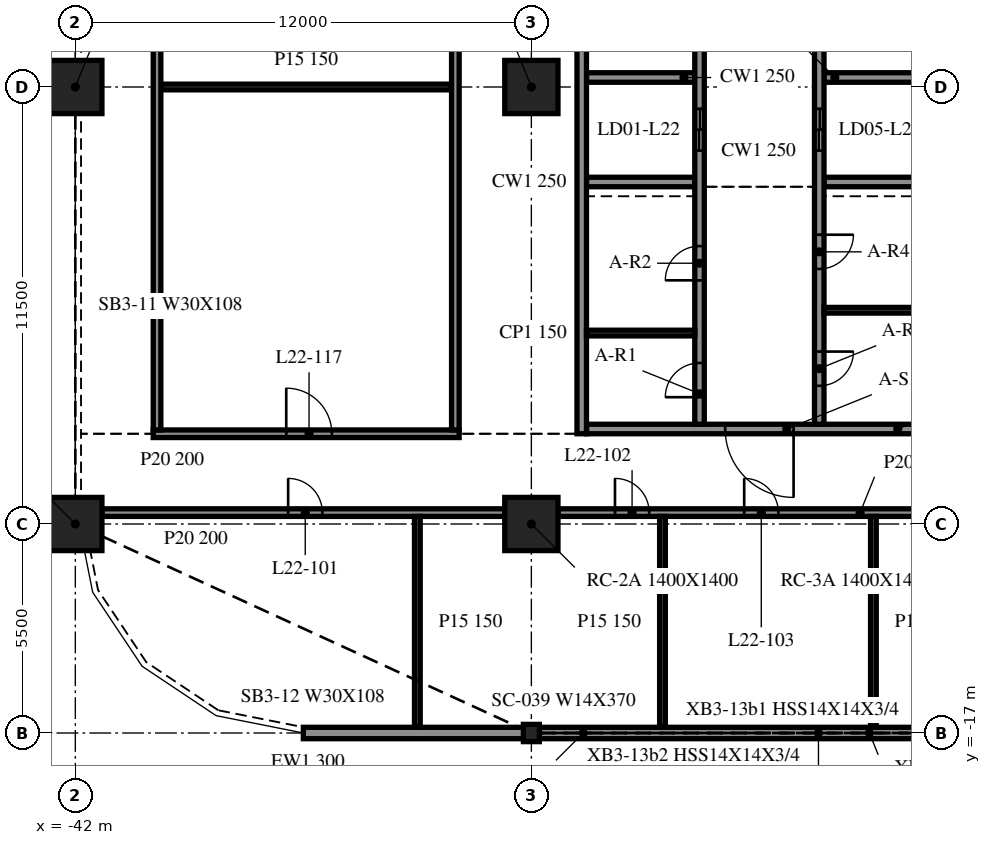
"""IFC4 building model, lengths in metres.
Left out: names, types, materials, properties, quantities, classifications, styles, units other than length and angle.
Written with IfcOpenShell. Run it as: python <this file> out.ifc"""

import sys

from ifc_helpers import new_model, si_unit, direction, frame, frame_2d, origin, origin_2d, place, context, subcontext, project, spatial, rectangle, i_section, extrude, element, fill, save


model = new_model("IFC4")
c1 = context("Model", 3, precision=1e-05, world=origin(), true_north=direction((0.0, 1.0)))
c2 = subcontext(c1, "Body", "Model", "MODEL_VIEW")
j1 = project(units=[si_unit("LENGTHUNIT", "METRE"), si_unit("PLANEANGLEUNIT", "RADIAN")], contexts=[c1])
p1 = place(None, origin())
s1 = spatial("IfcSite", under=j1, at=p1, CompositionType="ELEMENT")
p2 = place(p1, origin())
s2 = spatial("IfcBuilding", under=s1, at=p2, CompositionType="ELEMENT")
p3 = place(p2, frame((0.0, 0.0, 97.1)))
s3 = spatial("IfcBuildingStorey", under=s2, at=p3, CompositionType="ELEMENT", Elevation=97.1)
for number, where, z_axis, x_axis in (
    (1, (-42.0, -11.5, -0.34), (0.0, 0.0, 1.0), (1.0, 0.0, 0.0)),
    (2, (-42.0, 0.0, -0.34), (0.0, 0.0, 1.0), (1.0, 0.0, 0.0)),
    (3, (-30.0, -11.5, -0.34), (0.0, 0.0, 1.0), (1.0, 0.0, 0.0)),
    (4, (-30.0, 0.0, -0.34), (0.0, 0.0, 1.0), (1.0, 0.0, 0.0)),
):
    element("IfcColumn", number, at=place(p3, frame(where, z_axis=z_axis, x_axis=x_axis)), inside=s3, PredefinedType="COLUMN", context=c2, shape_type="SweptSolid", body=[
        extrude(rectangle(XDim=1.4, YDim=1.4, at=origin_2d()), origin(), (0.0, 0.0, 1.0), 4.1),
    ])
p4 = place(p3, frame((-30.0, -17.0, -0.34), z_axis=(0.0, 0.0, 1.0), x_axis=(1.0, 0.0, 0.0)))
e5 = element("IfcColumn", 5, at=p4, inside=s3, PredefinedType="COLUMN", context=c2, shape_type="SweptSolid", body=[
    extrude(i_section(OverallWidth=0.419, OverallDepth=0.455, WebThickness=0.042, FlangeThickness=0.068, at=origin_2d()), origin(), (0.0, 0.0, 1.0), 4.1),
])
p5 = place(p3, frame((-36.0, -17.0, 0.0), z_axis=(0.0, 0.0, 1.0), x_axis=(1.0, 0.0, 0.0)))
e6 = element("IfcWall", 6, at=p5, inside=s3, PredefinedType="NOTDEFINED", context=c2, shape_type="SweptSolid", body=[
    extrude(rectangle(XDim=5.979, YDim=0.3, at=frame_2d((2.99, 0.0))), origin(), (0.0, 0.0, 1.0), 3.003),
])
p6 = place(p3, frame((-29.979, -17.0, 0.0), z_axis=(0.0, 0.0, 1.0), x_axis=(1.0, 0.0, 0.0)))
e7 = element("IfcWall", 7, at=p6, inside=s3, PredefinedType="NOTDEFINED", context=c2, shape_type="SweptSolid", body=[
    extrude(rectangle(XDim=11.958, YDim=0.3, at=frame_2d((5.979, 0.0))), origin(), (0.0, 0.0, 1.0), 3.003),
])
p7 = place(p3, frame((-28.675, 15.125, 0.0), z_axis=(0.0, 0.0, 1.0), x_axis=(0.0, -1.0, 0.0)))
e8 = element("IfcWall", 8, at=p7, inside=s3, PredefinedType="SOLIDWALL", context=c2, shape_type="SweptSolid", body=[
    extrude(rectangle(XDim=24.25, YDim=0.25, at=frame_2d((12.125, 0.0))), origin(), (0.0, 0.0, 1.0), 3.76),
])
p8 = place(p3, frame((-19.45, -9.0, 0.0), z_axis=(0.0, 0.0, 1.0), x_axis=(-1.0, 0.0, 0.0)))
e9 = element("IfcWall", 9, at=p8, inside=s3, PredefinedType="SOLIDWALL", context=c2, shape_type="SweptSolid", body=[
    extrude(rectangle(XDim=9.1, YDim=0.25, at=frame_2d((4.55, 0.0))), origin(), (0.0, 0.0, 1.0), 3.76),
])
p9 = place(p8, frame((3.65, 0.0, 0.0)))
e10 = element("IfcOpeningElement", 10, at=p9, cuts=e9, PredefinedType="OPENING", context=c2, shape_type="SweptSolid", body=[
    extrude(rectangle(XDim=1.8, YDim=2.1, at=frame_2d((0.9, 1.05))), frame((0.0, 0.135, 0.0), z_axis=(0.0, -1.0, 0.0), x_axis=(1.0, 0.0, 0.0)), (0.0, 0.0, 1.0), 0.27),
])
p10 = place(p3, frame((-25.575, -8.875, 0.0), z_axis=(0.0, 0.0, 1.0), x_axis=(0.0, 1.0, 0.0)))
e11 = element("IfcWall", 11, at=p10, inside=s3, PredefinedType="SOLIDWALL", context=c2, shape_type="SweptSolid", body=[
    extrude(rectangle(XDim=17.5, YDim=0.25, at=frame_2d((8.75, 0.0))), origin(), (0.0, 0.0, 1.0), 3.76),
])
p11 = place(p10, frame((7.2, 0.0, 0.0)))
e12 = element("IfcOpeningElement", 12, at=p11, cuts=e11, PredefinedType="OPENING", context=c2, shape_type="SweptSolid", body=[
    extrude(rectangle(XDim=1.1, YDim=2.1, at=frame_2d((0.55, 1.05))), frame((0.0, 0.135, 0.0), z_axis=(0.0, -1.0, 0.0), x_axis=(1.0, 0.0, 0.0)), (0.0, 0.0, 1.0), 0.27),
])
p12 = place(p10, frame((9.95, 0.0, 0.0)))
e13 = element("IfcOpeningElement", 13, at=p12, cuts=e11, PredefinedType="OPENING", context=c2, shape_type="SweptSolid", body=[
    extrude(rectangle(XDim=1.1, YDim=2.1, at=frame_2d((0.55, 1.05))), frame((0.0, 0.135, 0.0), z_axis=(0.0, -1.0, 0.0), x_axis=(1.0, 0.0, 0.0)), (0.0, 0.0, 1.0), 0.27),
])
p13 = place(p10, frame((12.7, 0.0, 0.0)))
e14 = element("IfcOpeningElement", 14, at=p13, cuts=e11, PredefinedType="OPENING", context=c2, shape_type="SweptSolid", body=[
    extrude(rectangle(XDim=1.1, YDim=2.1, at=frame_2d((0.55, 1.05))), frame((0.0, 0.135, 0.0), z_axis=(0.0, -1.0, 0.0), x_axis=(1.0, 0.0, 0.0)), (0.0, 0.0, 1.0), 0.27),
])
p14 = place(p10, frame((15.45, 0.0, 0.0)))
e15 = element("IfcOpeningElement", 15, at=p14, cuts=e11, PredefinedType="OPENING", context=c2, shape_type="SweptSolid", body=[
    extrude(rectangle(XDim=1.1, YDim=2.1, at=frame_2d((0.55, 1.05))), frame((0.0, 0.135, 0.0), z_axis=(0.0, -1.0, 0.0), x_axis=(1.0, 0.0, 0.0)), (0.0, 0.0, 1.0), 0.27),
])
p15 = place(p10, frame((0.712, 0.0, 0.0)))
e16 = element("IfcOpeningElement", 16, at=p15, cuts=e11, PredefinedType="OPENING", context=c2, shape_type="SweptSolid", body=[
    extrude(rectangle(XDim=0.9, YDim=2.1, at=frame_2d((0.45, 1.05))), frame((0.0, 0.135, 0.0), z_axis=(0.0, -1.0, 0.0), x_axis=(1.0, 0.0, 0.0)), (0.0, 0.0, 1.0), 0.27),
])
p16 = place(p10, frame((3.788, 0.0, 0.0)))
e17 = element("IfcOpeningElement", 17, at=p16, cuts=e11, PredefinedType="OPENING", context=c2, shape_type="SweptSolid", body=[
    extrude(rectangle(XDim=0.9, YDim=2.1, at=frame_2d((0.45, 1.05))), frame((0.0, 0.135, 0.0), z_axis=(0.0, -1.0, 0.0), x_axis=(1.0, 0.0, 0.0)), (0.0, 0.0, 1.0), 0.27),
])
p17 = place(p3, frame((-22.425, 14.875, 0.0), z_axis=(0.0, 0.0, 1.0), x_axis=(0.0, -1.0, 0.0)))
e18 = element("IfcWall", 18, at=p17, inside=s3, PredefinedType="SOLIDWALL", context=c2, shape_type="SweptSolid", body=[
    extrude(rectangle(XDim=23.75, YDim=0.25, at=frame_2d((11.875, 0.0))), origin(), (0.0, 0.0, 1.0), 3.76),
])
p18 = place(p17, frame((15.45, 0.0, 0.0)))
e19 = element("IfcOpeningElement", 19, at=p18, cuts=e18, PredefinedType="OPENING", context=c2, shape_type="SweptSolid", body=[
    extrude(rectangle(XDim=1.1, YDim=2.1, at=frame_2d((0.55, 1.05))), frame((0.0, 0.135, 0.0), z_axis=(0.0, -1.0, 0.0), x_axis=(1.0, 0.0, 0.0)), (0.0, 0.0, 1.0), 0.27),
])
p19 = place(p17, frame((12.7, 0.0, 0.0)))
e20 = element("IfcOpeningElement", 20, at=p19, cuts=e18, PredefinedType="OPENING", context=c2, shape_type="SweptSolid", body=[
    extrude(rectangle(XDim=1.1, YDim=2.1, at=frame_2d((0.55, 1.05))), frame((0.0, 0.135, 0.0), z_axis=(0.0, -1.0, 0.0), x_axis=(1.0, 0.0, 0.0)), (0.0, 0.0, 1.0), 0.27),
])
p20 = place(p17, frame((21.837, 0.0, 0.0)))
e21 = element("IfcOpeningElement", 21, at=p20, cuts=e18, PredefinedType="OPENING", context=c2, shape_type="SweptSolid", body=[
    extrude(rectangle(XDim=0.9, YDim=2.1, at=frame_2d((0.45, 1.05))), frame((0.0, 0.135, 0.0), z_axis=(0.0, -1.0, 0.0), x_axis=(1.0, 0.0, 0.0)), (0.0, 0.0, 1.0), 0.27),
])
p21 = place(p17, frame((18.762, 0.0, 0.0)))
e22 = element("IfcOpeningElement", 22, at=p21, cuts=e18, PredefinedType="OPENING", context=c2, shape_type="SweptSolid", body=[
    extrude(rectangle(XDim=0.9, YDim=2.1, at=frame_2d((0.45, 1.05))), frame((0.0, 0.135, 0.0), z_axis=(0.0, -1.0, 0.0), x_axis=(1.0, 0.0, 0.0)), (0.0, 0.0, 1.0), 0.27),
])
p22 = place(p17, frame((4.587, 0.0, 0.0)))
e23 = element("IfcOpeningElement", 23, at=p22, cuts=e18, PredefinedType="OPENING", context=c2, shape_type="SweptSolid", body=[
    extrude(rectangle(XDim=0.9, YDim=2.1, at=frame_2d((0.45, 1.05))), frame((0.0, 0.135, 0.0), z_axis=(0.0, -1.0, 0.0), x_axis=(1.0, 0.0, 0.0)), (0.0, 0.0, 1.0), 0.27),
])
p23 = place(p17, frame((2.55, 0.0, 0.0)))
e24 = element("IfcOpeningElement", 24, at=p23, cuts=e18, PredefinedType="OPENING", context=c2, shape_type="SweptSolid", body=[
    extrude(rectangle(XDim=0.9, YDim=2.1, at=frame_2d((0.45, 1.05))), frame((0.0, 0.135, 0.0), z_axis=(0.0, -1.0, 0.0), x_axis=(1.0, 0.0, 0.0)), (0.0, 0.0, 1.0), 0.27),
])
p24 = place(p17, frame((0.512, 0.0, 0.0)))
e25 = element("IfcOpeningElement", 25, at=p24, cuts=e18, PredefinedType="OPENING", context=c2, shape_type="SweptSolid", body=[
    extrude(rectangle(XDim=0.9, YDim=2.1, at=frame_2d((0.45, 1.05))), frame((0.0, 0.135, 0.0), z_axis=(0.0, -1.0, 0.0), x_axis=(1.0, 0.0, 0.0)), (0.0, 0.0, 1.0), 0.27),
])
for number, where, z_axis, x_axis in (
    (26, (-28.55, -2.5, 0.0), (0.0, 0.0, 1.0), (1.0, 0.0, 0.0)),
    (27, (-28.55, 0.25, 0.0), (0.0, 0.0, 1.0), (1.0, 0.0, 0.0)),
    (28, (-22.3, -2.5, 0.0), (0.0, 0.0, 1.0), (1.0, 0.0, 0.0)),
    (29, (-22.3, 0.25, 0.0), (0.0, 0.0, 1.0), (1.0, 0.0, 0.0)),
):
    element("IfcWall", number, at=place(p3, frame(where, z_axis=z_axis, x_axis=x_axis)), inside=s3, PredefinedType="SOLIDWALL", context=c2, shape_type="SweptSolid", body=[
        extrude(rectangle(XDim=2.85, YDim=0.25, at=frame_2d((1.425, 0.0))), origin(), (0.0, 0.0, 1.0), 3.76),
    ])
for number, where, z_axis, x_axis in (
    (30, (-28.55, -6.475, 0.0), (0.0, 0.0, 1.0), (1.0, 0.0, 0.0)),
    (31, (-22.3, -5.875, 0.0), (0.0, 0.0, 1.0), (1.0, 0.0, 0.0)),
):
    element("IfcWall", number, at=place(p3, frame(where, z_axis=z_axis, x_axis=x_axis)), inside=s3, PredefinedType="PARTITIONING", context=c2, shape_type="SweptSolid", body=[
        extrude(rectangle(XDim=2.85, YDim=0.15, at=frame_2d((1.425, 0.0))), origin(), (0.0, 0.0, 1.0), 3.76),
    ])
p25 = place(p3, frame((-41.3, -11.2, 0.0), z_axis=(0.0, 0.0, 1.0), x_axis=(1.0, 0.0, 0.0)))
e32 = element("IfcWall", 32, at=p25, inside=s3, PredefinedType="PARTITIONING", context=c2, shape_type="SweptSolid", body=[
    extrude(rectangle(XDim=10.6, YDim=0.2, at=frame_2d((5.3, 0.0))), origin(), (0.0, 0.0, 1.0), 3.76),
])
p26 = place(p25, frame((4.9, 0.0, 0.0)))
e33 = element("IfcOpeningElement", 33, at=p26, cuts=e32, PredefinedType="OPENING", context=c2, shape_type="SweptSolid", body=[
    extrude(rectangle(XDim=0.9, YDim=2.1, at=frame_2d((0.45, 1.05))), frame((0.0, 0.11, 0.0), z_axis=(0.0, -1.0, 0.0), x_axis=(1.0, 0.0, 0.0)), (0.0, 0.0, 1.0), 0.22),
])
p27 = place(p3, frame((-29.3, -11.2, 0.0), z_axis=(0.0, 0.0, 1.0), x_axis=(1.0, 0.0, 0.0)))
e34 = element("IfcWall", 34, at=p27, inside=s3, PredefinedType="PARTITIONING", context=c2, shape_type="SweptSolid", body=[
    extrude(rectangle(XDim=10.6, YDim=0.2, at=frame_2d((5.3, 0.0))), origin(), (0.0, 0.0, 1.0), 3.76),
])
p28 = place(p27, frame((1.5, 0.0, 0.0)))
e35 = element("IfcOpeningElement", 35, at=p28, cuts=e34, PredefinedType="OPENING", context=c2, shape_type="SweptSolid", body=[
    extrude(rectangle(XDim=0.9, YDim=2.1, at=frame_2d((0.45, 1.05))), frame((0.0, 0.11, 0.0), z_axis=(0.0, -1.0, 0.0), x_axis=(1.0, 0.0, 0.0)), (0.0, 0.0, 1.0), 0.22),
])
p29 = place(p27, frame((4.9, 0.0, 0.0)))
e36 = element("IfcOpeningElement", 36, at=p29, cuts=e34, PredefinedType="OPENING", context=c2, shape_type="SweptSolid", body=[
    extrude(rectangle(XDim=0.9, YDim=2.1, at=frame_2d((0.45, 1.05))), frame((0.0, 0.11, 0.0), z_axis=(0.0, -1.0, 0.0), x_axis=(1.0, 0.0, 0.0)), (0.0, 0.0, 1.0), 0.22),
])
p30 = place(p3, frame((-39.95, -9.125, 0.0), z_axis=(0.0, 0.0, 1.0), x_axis=(1.0, 0.0, 0.0)))
e37 = element("IfcWall", 37, at=p30, inside=s3, PredefinedType="PARTITIONING", context=c2, shape_type="SweptSolid", body=[
    extrude(rectangle(XDim=8.05, YDim=0.2, at=frame_2d((4.025, 0.0))), origin(), (0.0, 0.0, 1.0), 3.76),
])
p31 = place(p30, frame((3.5, 0.0, 0.0)))
e38 = element("IfcOpeningElement", 38, at=p31, cuts=e37, PredefinedType="OPENING", context=c2, shape_type="SweptSolid", body=[
    extrude(rectangle(XDim=1.2, YDim=2.1, at=frame_2d((0.6, 1.05))), frame((0.0, 0.11, 0.0), z_axis=(0.0, -1.0, 0.0), x_axis=(1.0, 0.0, 0.0)), (0.0, 0.0, 1.0), 0.22),
])
p32 = place(p3, frame((-39.75, 0.0, 0.0), z_axis=(0.0, 0.0, 1.0), x_axis=(1.0, 0.0, 0.0)))
e39 = element("IfcWall", 39, at=p32, inside=s3, PredefinedType="PARTITIONING", context=c2, shape_type="SweptSolid", body=[
    extrude(rectangle(XDim=7.65, YDim=0.15, at=frame_2d((3.825, 0.0))), origin(), (0.0, 0.0, 1.0), 3.76),
])
p33 = place(p3, frame((-39.85, -9.025, 0.0), z_axis=(0.0, 0.0, 1.0), x_axis=(0.0, 1.0, 0.0)))
e40 = element("IfcWall", 40, at=p33, inside=s3, PredefinedType="PARTITIONING", context=c2, shape_type="SweptSolid", body=[
    extrude(rectangle(XDim=24.05, YDim=0.2, at=frame_2d((12.025, 0.0))), origin(), (0.0, 0.0, 1.0), 3.76),
])
p34 = place(p3, frame((-33.0, -16.85, 0.0), z_axis=(0.0, 0.0, 1.0), x_axis=(0.0, 1.0, 0.0)))
e41 = element("IfcWall", 41, at=p34, inside=s3, PredefinedType="PARTITIONING", context=c2, shape_type="SweptSolid", body=[
    extrude(rectangle(XDim=5.55, YDim=0.15, at=frame_2d((2.775, 0.0))), origin(), (0.0, 0.0, 1.0), 3.76),
])
p35 = place(p3, frame((-32.0, -9.025, 0.0), z_axis=(0.0, 0.0, 1.0), x_axis=(0.0, 1.0, 0.0)))
e42 = element("IfcWall", 42, at=p35, inside=s3, PredefinedType="PARTITIONING", context=c2, shape_type="SweptSolid", body=[
    extrude(rectangle(XDim=24.05, YDim=0.2, at=frame_2d((12.025, 0.0))), origin(), (0.0, 0.0, 1.0), 3.76),
])
for number, where, z_axis, x_axis in (
    (43, (-26.55, -16.85, 0.0), (0.0, 0.0, 1.0), (0.0, 1.0, 0.0)),
    (44, (-21.0, -16.85, 0.0), (0.0, 0.0, 1.0), (0.0, 1.0, 0.0)),
):
    element("IfcWall", number, at=place(p3, frame(where, z_axis=z_axis, x_axis=x_axis)), inside=s3, PredefinedType="PARTITIONING", context=c2, shape_type="SweptSolid", body=[
        extrude(rectangle(XDim=5.55, YDim=0.15, at=frame_2d((2.775, 0.0))), origin(), (0.0, 0.0, 1.0), 3.76),
    ])
p36 = place(p9, origin())
e45 = element("IfcDoor", 45, at=p36, inside=s3, OperationType="DOUBLE_DOOR_SINGLE_SWING", PredefinedType="DOOR", context=c2, shape_type="SweptSolid", body=[
    extrude(rectangle(XDim=1.8, YDim=2.1, at=frame_2d((0.9, 1.05))), frame((0.0, 0.025, 0.0), z_axis=(0.0, -1.0, 0.0), x_axis=(1.0, 0.0, 0.0)), (0.0, 0.0, 1.0), 0.05),
])
fill(e10, e45)
p37 = place(p18, origin())
e46 = element("IfcDoor", 46, at=p37, inside=s3, OperationType="DOUBLE_DOOR_SLIDING", PredefinedType="DOOR", context=c2, shape_type="SweptSolid", body=[
    extrude(rectangle(XDim=1.1, YDim=2.1, at=frame_2d((0.55, 1.05))), frame((0.0, 0.025, 0.0), z_axis=(0.0, -1.0, 0.0), x_axis=(1.0, 0.0, 0.0)), (0.0, 0.0, 1.0), 0.05),
])
fill(e19, e46)
p38 = place(p11, origin())
e47 = element("IfcDoor", 47, at=p38, inside=s3, OperationType="DOUBLE_DOOR_SLIDING", PredefinedType="DOOR", context=c2, shape_type="SweptSolid", body=[
    extrude(rectangle(XDim=1.1, YDim=2.1, at=frame_2d((0.55, 1.05))), frame((0.0, 0.025, 0.0), z_axis=(0.0, -1.0, 0.0), x_axis=(1.0, 0.0, 0.0)), (0.0, 0.0, 1.0), 0.05),
])
fill(e12, e47)
p39 = place(p15, origin())
e48 = element("IfcDoor", 48, at=p39, inside=s3, OperationType="SINGLE_SWING_LEFT", PredefinedType="DOOR", context=c2, shape_type="SweptSolid", body=[
    extrude(rectangle(XDim=0.9, YDim=2.1, at=frame_2d((0.45, 1.05))), frame((0.0, 0.025, 0.0), z_axis=(0.0, -1.0, 0.0), x_axis=(1.0, 0.0, 0.0)), (0.0, 0.0, 1.0), 0.05),
])
fill(e16, e48)
p40 = place(p16, origin())
e49 = element("IfcDoor", 49, at=p40, inside=s3, OperationType="SINGLE_SWING_RIGHT", PredefinedType="DOOR", context=c2, shape_type="SweptSolid", body=[
    extrude(rectangle(XDim=0.9, YDim=2.1, at=frame_2d((0.45, 1.05))), frame((0.0, 0.025, 0.0), z_axis=(0.0, -1.0, 0.0), x_axis=(1.0, 0.0, 0.0)), (0.0, 0.0, 1.0), 0.05),
])
fill(e17, e49)
p41 = place(p20, origin())
e50 = element("IfcDoor", 50, at=p41, inside=s3, OperationType="SINGLE_SWING_LEFT", PredefinedType="DOOR", context=c2, shape_type="SweptSolid", body=[
    extrude(rectangle(XDim=0.9, YDim=2.1, at=frame_2d((0.45, 1.05))), frame((0.0, 0.025, 0.0), z_axis=(0.0, -1.0, 0.0), x_axis=(1.0, 0.0, 0.0)), (0.0, 0.0, 1.0), 0.05),
])
fill(e21, e50)
p42 = place(p21, origin())
e51 = element("IfcDoor", 51, at=p42, inside=s3, OperationType="SINGLE_SWING_RIGHT", PredefinedType="DOOR", context=c2, shape_type="SweptSolid", body=[
    extrude(rectangle(XDim=0.9, YDim=2.1, at=frame_2d((0.45, 1.05))), frame((0.0, 0.025, 0.0), z_axis=(0.0, -1.0, 0.0), x_axis=(1.0, 0.0, 0.0)), (0.0, 0.0, 1.0), 0.05),
])
fill(e22, e51)
p43 = place(p26, origin())
e52 = element("IfcDoor", 52, at=p43, inside=s3, OperationType="SINGLE_SWING_LEFT", PredefinedType="DOOR", context=c2, shape_type="SweptSolid", body=[
    extrude(rectangle(XDim=0.9, YDim=2.1, at=frame_2d((0.45, 1.05))), frame((0.0, 0.025, 0.0), z_axis=(0.0, -1.0, 0.0), x_axis=(1.0, 0.0, 0.0)), (0.0, 0.0, 1.0), 0.05),
])
fill(e33, e52)
p44 = place(p28, origin())
e53 = element("IfcDoor", 53, at=p44, inside=s3, OperationType="SINGLE_SWING_RIGHT", PredefinedType="DOOR", context=c2, shape_type="SweptSolid", body=[
    extrude(rectangle(XDim=0.9, YDim=2.1, at=frame_2d((0.45, 1.05))), frame((0.0, 0.025, 0.0), z_axis=(0.0, -1.0, 0.0), x_axis=(1.0, 0.0, 0.0)), (0.0, 0.0, 1.0), 0.05),
])
fill(e35, e53)
p45 = place(p29, origin())
e54 = element("IfcDoor", 54, at=p45, inside=s3, OperationType="SINGLE_SWING_LEFT", PredefinedType="DOOR", context=c2, shape_type="SweptSolid", body=[
    extrude(rectangle(XDim=0.9, YDim=2.1, at=frame_2d((0.45, 1.05))), frame((0.0, 0.025, 0.0), z_axis=(0.0, -1.0, 0.0), x_axis=(1.0, 0.0, 0.0)), (0.0, 0.0, 1.0), 0.05),
])
fill(e36, e54)
p46 = place(p31, origin())
e55 = element("IfcDoor", 55, at=p46, inside=s3, OperationType="SINGLE_SWING_RIGHT", PredefinedType="DOOR", context=c2, shape_type="SweptSolid", body=[
    extrude(rectangle(XDim=1.2, YDim=2.1, at=frame_2d((0.6, 1.05))), frame((0.0, 0.025, 0.0), z_axis=(0.0, -1.0, 0.0), x_axis=(1.0, 0.0, 0.0)), (0.0, 0.0, 1.0), 0.05),
])
fill(e38, e55)
save(model, sys.argv[1])
